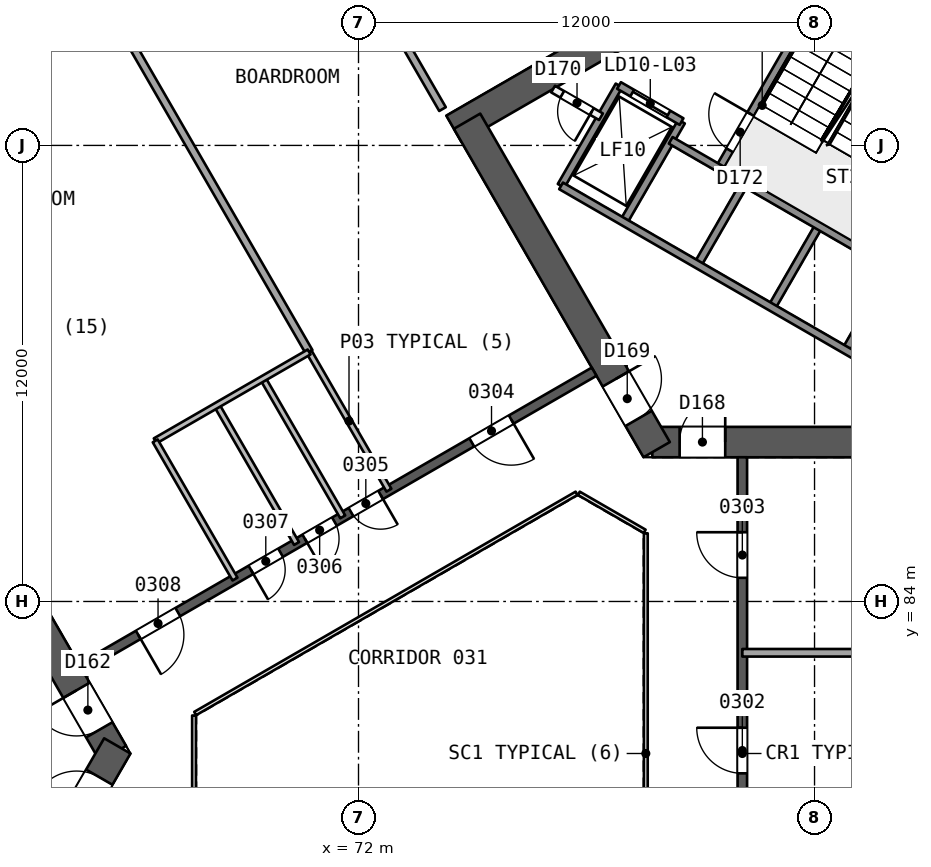
"""IFC4 building model, lengths in metres.
Left out: names, types, materials, properties, quantities, classifications, styles, units other than length and angle.
Written with IfcOpenShell. Run it as: python <this file> out.ifc"""

import sys

from ifc_helpers import new_model, si_unit, direction, frame, frame_2d, origin, place, context, subcontext, project, spatial, rectangle, extrude, element, fill, save


model = new_model("IFC4")
c1 = context("Model", 3, precision=1e-05, world=origin(), true_north=direction((0.0, 1.0)))
c2 = subcontext(c1, "Body", "Model", "MODEL_VIEW")
j1 = project(units=[si_unit("LENGTHUNIT", "METRE"), si_unit("PLANEANGLEUNIT", "RADIAN")], contexts=[c1])
p1 = place(None, origin())
s1 = spatial("IfcSite", under=j1, at=p1, CompositionType="ELEMENT")
p2 = place(p1, origin())
s2 = spatial("IfcBuilding", under=s1, at=p2, CompositionType="ELEMENT")
p3 = place(p2, frame((0.0, 0.0, 20.4)))
s3 = spatial("IfcBuildingStorey", under=s2, at=p3, CompositionType="ELEMENT", Elevation=20.4)
p4 = place(p3, frame((65.538, 80.0, 0.0), z_axis=(0.0, 0.0, 1.0), x_axis=(-0.49999662545, 0.866027352073, 0.0)))
e1 = element("IfcWall", 1, at=p4, inside=s3, PredefinedType="SHEAR", context=c2, shape_type="SweptSolid", body=[
    extrude(rectangle(XDim=10.149, YDim=0.8, at=frame_2d((5.074, 0.0))), origin(), (0.0, 0.0, 1.0), 5.0),
])
p5 = place(p4, frame((0.719, 0.0, 0.0)))
e2 = element("IfcOpeningElement", 2, at=p5, cuts=e1, PredefinedType="OPENING", context=c2, shape_type="SweptSolid", body=[
    extrude(rectangle(XDim=1.2, YDim=2.1, at=frame_2d((0.6, 1.05))), frame((0.0, 0.411, 0.0), z_axis=(0.0, -1.0, 0.0), x_axis=(1.0, 0.0, 0.0)), (0.0, 0.0, 1.0), 0.821),
])
p6 = place(p3, frame((60.664, 71.557, 0.0), z_axis=(0.0, 0.0, 1.0), x_axis=(0.50000409368, 0.866023040284, 0.0)))
e3 = element("IfcWall", 3, at=p6, inside=s3, PredefinedType="SHEAR", context=c2, shape_type="SweptSolid", body=[
    extrude(rectangle(XDim=9.98, YDim=0.8, at=frame_2d((4.99, 0.0))), origin(), (0.0, 0.0, 1.0), 5.0),
])
p7 = place(p6, frame((7.83, 0.0, 0.0)))
e4 = element("IfcOpeningElement", 4, at=p7, cuts=e3, PredefinedType="OPENING", context=c2, shape_type="SweptSolid", body=[
    extrude(rectangle(XDim=1.2, YDim=2.1, at=frame_2d((0.6, 1.05))), frame((0.0, 0.411, 0.0), z_axis=(0.0, -1.0, 0.0), x_axis=(1.0, 0.0, 0.0)), (0.0, 0.0, 1.0), 0.821),
])
p8 = place(p3, frame((79.731, 88.194, 0.0), z_axis=(0.0, 0.0, 1.0), x_axis=(1.0, 0.0, 0.0)))
e5 = element("IfcWall", 5, at=p8, inside=s3, PredefinedType="SHEAR", context=c2, shape_type="SweptSolid", body=[
    extrude(rectangle(XDim=10.149, YDim=0.8, at=frame_2d((5.074, 0.0))), origin(), (0.0, 0.0, 1.0), 5.0),
])
p9 = place(p8, frame((0.719, 0.0, 0.0)))
e6 = element("IfcOpeningElement", 6, at=p9, cuts=e5, PredefinedType="OPENING", context=c2, shape_type="SweptSolid", body=[
    extrude(rectangle(XDim=1.2, YDim=2.1, at=frame_2d((0.6, 1.05))), frame((0.0, 0.411, 0.0), z_axis=(0.0, -1.0, 0.0), x_axis=(1.0, 0.0, 0.0)), (0.0, 0.0, 1.0), 0.821),
])
p10 = place(p3, frame((86.723, 103.488, 0.0), z_axis=(0.0, 0.0, 1.0), x_axis=(-0.866032504327, -0.499987701298, 0.0)))
e7 = element("IfcWall", 7, at=p10, inside=s3, PredefinedType="SHEAR", context=c2, shape_type="SweptSolid", body=[
    extrude(rectangle(XDim=14.102, YDim=0.8, at=frame_2d((7.051, 0.0))), origin(), (0.0, 0.0, 1.0), 5.0),
])
p11 = place(p3, frame((74.856, 96.637, 0.0), z_axis=(0.0, 0.0, 1.0), x_axis=(0.499993500917, -0.866029155999, 0.0)))
e8 = element("IfcWall", 8, at=p11, inside=s3, PredefinedType="SHEAR", context=c2, shape_type="SweptSolid", body=[
    extrude(rectangle(XDim=9.98, YDim=0.8, at=frame_2d((4.99, 0.0))), origin(), (0.0, 0.0, 1.0), 5.0),
])
p12 = place(p11, frame((7.83, 0.0, 0.0)))
e9 = element("IfcOpeningElement", 9, at=p12, cuts=e8, PredefinedType="OPENING", context=c2, shape_type="SweptSolid", body=[
    extrude(rectangle(XDim=1.2, YDim=2.1, at=frame_2d((0.6, 1.05))), frame((0.0, 0.411, 0.0), z_axis=(0.0, -1.0, 0.0), x_axis=(1.0, 0.0, 0.0)), (0.0, 0.0, 1.0), 0.821),
])
p13 = place(p3, frame((82.1, 72.206, 0.0), z_axis=(0.0, 0.0, 1.0), x_axis=(0.0, 1.0, 0.0)))
e10 = element("IfcWall", 10, at=p13, inside=s3, PredefinedType="SHEAR", context=c2, shape_type="SweptSolid", body=[
    extrude(rectangle(XDim=15.588, YDim=0.25, at=frame_2d((7.794, 0.0))), origin(), (0.0, 0.0, 1.0), 4.5),
])
p14 = place(p13, frame((2.05, 0.0, 0.0)))
e11 = element("IfcOpeningElement", 11, at=p14, cuts=e10, PredefinedType="OPENING", context=c2, shape_type="SweptSolid", body=[
    extrude(rectangle(XDim=1.2, YDim=2.4, at=frame_2d((0.6, 1.2))), frame((0.0, 0.135, 0.0), z_axis=(0.0, -1.0, 0.0), x_axis=(1.0, 0.0, 0.0)), (0.0, 0.0, 1.0), 0.271),
])
p15 = place(p13, frame((7.272, 0.0, 0.0)))
e12 = element("IfcOpeningElement", 12, at=p15, cuts=e10, PredefinedType="OPENING", context=c2, shape_type="SweptSolid", body=[
    extrude(rectangle(XDim=1.2, YDim=2.4, at=frame_2d((0.6, 1.2))), frame((0.0, 0.135, 0.0), z_axis=(0.0, -1.0, 0.0), x_axis=(1.0, 0.0, 0.0)), (0.0, 0.0, 1.0), 0.271),
])
p16 = place(p13, frame((12.417, 0.0, 0.0)))
e13 = element("IfcOpeningElement", 13, at=p16, cuts=e10, PredefinedType="OPENING", context=c2, shape_type="SweptSolid", body=[
    extrude(rectangle(XDim=1.2, YDim=2.4, at=frame_2d((0.6, 1.2))), frame((0.0, 0.135, 0.0), z_axis=(0.0, -1.0, 0.0), x_axis=(1.0, 0.0, 0.0)), (0.0, 0.0, 1.0), 0.271),
])
p17 = place(p3, frame((78.2, 90.046, 0.0), z_axis=(0.0, 0.0, 1.0), x_axis=(-0.866026492143, -0.499998114903, 0.0)))
e14 = element("IfcWall", 14, at=p17, inside=s3, PredefinedType="SHEAR", context=c2, shape_type="SweptSolid", body=[
    extrude(rectangle(XDim=15.588, YDim=0.25, at=frame_2d((7.794, 0.0))), origin(), (0.0, 0.0, 1.0), 4.5),
])
p18 = place(p17, frame((2.518, 0.0, 0.0)))
e15 = element("IfcOpeningElement", 15, at=p18, cuts=e14, PredefinedType="OPENING", context=c2, shape_type="SweptSolid", body=[
    extrude(rectangle(XDim=1.2, YDim=2.4, at=frame_2d((0.6, 1.2))), frame((0.0, 0.135, 0.0), z_axis=(0.0, -1.0, 0.0), x_axis=(1.0, 0.0, 0.0)), (0.0, 0.0, 1.0), 0.271),
])
p19 = place(p17, frame((6.487, 0.0, 0.0)))
e16 = element("IfcOpeningElement", 16, at=p19, cuts=e14, PredefinedType="OPENING", context=c2, shape_type="SweptSolid", body=[
    extrude(rectangle(XDim=0.9, YDim=2.1, at=frame_2d((0.45, 1.05))), frame((0.0, 0.135, 0.0), z_axis=(0.0, -1.0, 0.0), x_axis=(1.0, 0.0, 0.0)), (0.0, 0.0, 1.0), 0.271),
])
p20 = place(p17, frame((7.89, 0.0, 0.0)))
e17 = element("IfcOpeningElement", 17, at=p20, cuts=e14, PredefinedType="OPENING", context=c2, shape_type="SweptSolid", body=[
    extrude(rectangle(XDim=0.9, YDim=2.1, at=frame_2d((0.45, 1.05))), frame((0.0, 0.135, 0.0), z_axis=(0.0, -1.0, 0.0), x_axis=(1.0, 0.0, 0.0)), (0.0, 0.0, 1.0), 0.271),
])
p21 = place(p17, frame((9.527, 0.0, 0.0)))
e18 = element("IfcOpeningElement", 18, at=p21, cuts=e14, PredefinedType="OPENING", context=c2, shape_type="SweptSolid", body=[
    extrude(rectangle(XDim=0.9, YDim=2.1, at=frame_2d((0.45, 1.05))), frame((0.0, 0.135, 0.0), z_axis=(0.0, -1.0, 0.0), x_axis=(1.0, 0.0, 0.0)), (0.0, 0.0, 1.0), 0.271),
])
p22 = place(p17, frame((12.65, 0.0, 0.0)))
e19 = element("IfcOpeningElement", 19, at=p22, cuts=e14, PredefinedType="OPENING", context=c2, shape_type="SweptSolid", body=[
    extrude(rectangle(XDim=1.2, YDim=2.4, at=frame_2d((0.6, 1.2))), frame((0.0, 0.135, 0.0), z_axis=(0.0, -1.0, 0.0), x_axis=(1.0, 0.0, 0.0)), (0.0, 0.0, 1.0), 0.271),
])
p23 = place(p3, frame((103.301, 82.65, 0.0), z_axis=(0.0, 0.0, 1.0), x_axis=(-1.0, 0.0, 0.0)))
e20 = element("IfcWall", 20, at=p23, inside=s3, PredefinedType="PARTITIONING", context=c2, shape_type="SweptSolid", body=[
    extrude(rectangle(XDim=21.201, YDim=0.2, at=frame_2d((10.601, 0.0))), origin(), (0.0, 0.0, 1.0), 4.5),
])
p24 = place(p3, frame((70.7, 90.565, 0.0), z_axis=(0.0, 0.0, 1.0), x_axis=(0.500027713859, -0.866009402589, 0.0)))
e21 = element("IfcWall", 21, at=p24, inside=s3, PredefinedType="PARTITIONING", context=c2, shape_type="SweptSolid", body=[
    extrude(rectangle(XDim=4.2, YDim=0.15, at=frame_2d((2.1, 0.0))), origin(), (0.0, 0.0, 1.0), 4.5),
])
p25 = place(p3, frame((62.2, 105.289, 0.0), z_axis=(0.0, 0.0, 1.0), x_axis=(0.49999717083, -0.8660270372, 0.0)))
e22 = element("IfcWall", 22, at=p25, inside=s3, PredefinedType="PARTITIONING", context=c2, shape_type="SweptSolid", body=[
    extrude(rectangle(XDim=17.001, YDim=0.2, at=frame_2d((8.5, 0.0))), origin(), (0.0, 0.0, 1.0), 4.5),
])
p26 = place(p3, frame((74.21, 96.956, 0.0), z_axis=(0.0, 0.0, 1.0), x_axis=(-0.499981745636, 0.86603594269, 0.0)))
e23 = element("IfcWall", 23, at=p26, inside=s3, PredefinedType="PARTITIONING", context=c2, shape_type="SweptSolid", body=[
    extrude(rectangle(XDim=6.765, YDim=0.2, at=frame_2d((3.382, 0.0))), origin(), (0.0, 0.0, 1.0), 4.5),
])
p27 = place(p26, frame((2.782, 0.0, 0.0)))
e24 = element("IfcOpeningElement", 24, at=p27, cuts=e23, PredefinedType="OPENING", context=c2, shape_type="SweptSolid", body=[
    extrude(rectangle(XDim=1.2, YDim=2.4, at=frame_2d((0.6, 1.2))), frame((0.0, 0.11, 0.0), z_axis=(0.0, -1.0, 0.0), x_axis=(1.0, 0.0, 0.0)), (0.0, 0.0, 1.0), 0.221),
])
p28 = place(p3, frame((69.485, 89.864, 0.0), z_axis=(0.0, 0.0, 1.0), x_axis=(0.49998411664, -0.866034573852, 0.0)))
e25 = element("IfcWall", 25, at=p28, inside=s3, PredefinedType="PARTITIONING", context=c2, shape_type="SweptSolid", body=[
    extrude(rectangle(XDim=4.2, YDim=0.15, at=frame_2d((2.1, 0.0))), origin(), (0.0, 0.0, 1.0), 4.5),
])
p29 = place(p3, frame((68.27, 89.163, 0.0), z_axis=(0.0, 0.0, 1.0), x_axis=(0.500002543286, -0.866023935413, 0.0)))
e26 = element("IfcWall", 26, at=p29, inside=s3, PredefinedType="PARTITIONING", context=c2, shape_type="SweptSolid", body=[
    extrude(rectangle(XDim=4.2, YDim=0.15, at=frame_2d((2.1, 0.0))), origin(), (0.0, 0.0, 1.0), 4.5),
])
p30 = place(p3, frame((70.7, 90.565, 0.0), z_axis=(0.0, 0.0, 1.0), x_axis=(-0.866017799667, -0.500013170487, 0.0)))
e27 = element("IfcWall", 27, at=p30, inside=s3, PredefinedType="PARTITIONING", context=c2, shape_type="SweptSolid", body=[
    extrude(rectangle(XDim=4.677, YDim=0.15, at=frame_2d((2.338, 0.0))), origin(), (0.0, 0.0, 1.0), 4.5),
])
p31 = place(p3, frame((66.65, 88.226, 0.0), z_axis=(0.0, 0.0, 1.0), x_axis=(0.500016035621, -0.866016145416, 0.0)))
e28 = element("IfcWall", 28, at=p31, inside=s3, PredefinedType="PARTITIONING", context=c2, shape_type="SweptSolid", body=[
    extrude(rectangle(XDim=4.199, YDim=0.15, at=frame_2d((2.1, 0.0))), origin(), (0.0, 0.0, 1.0), 4.5),
])
p32 = place(p3, frame((26.66, 85.0, 0.0), z_axis=(0.0, 0.0, 1.0), x_axis=(0.866025599265, 0.499999661418, 0.0)))
e29 = element("IfcWall", 29, at=p32, inside=s3, PredefinedType="SOLIDWALL", context=c2, shape_type="SweptSolid", body=[
    extrude(rectangle(XDim=78.727, YDim=0.4, at=frame_2d((39.364, 0.0))), origin(), (0.0, 0.0, 1.0), 4.5),
])
p33 = place(p32, frame((42.84, 0.0, 0.9)))
e30 = element("IfcOpeningElement", 30, at=p33, cuts=e29, PredefinedType="OPENING", context=c2, shape_type="SweptSolid", body=[
    extrude(rectangle(XDim=2.4, YDim=2.4, at=frame_2d((1.2, 1.2))), frame((0.0, 0.21, 0.0), z_axis=(0.0, -1.0, 0.0), x_axis=(1.0, 0.0, 0.0)), (0.0, 0.0, 1.0), 0.421),
])
p34 = place(p32, frame((37.385, 0.0, 0.9)))
e31 = element("IfcOpeningElement", 31, at=p34, cuts=e29, PredefinedType="OPENING", context=c2, shape_type="SweptSolid", body=[
    extrude(rectangle(XDim=2.4, YDim=2.4, at=frame_2d((1.2, 1.2))), frame((0.0, 0.21, 0.0), z_axis=(0.0, -1.0, 0.0), x_axis=(1.0, 0.0, 0.0)), (0.0, 0.0, 1.0), 0.421),
])
p35 = place(p32, frame((32.708, 0.0, 0.9)))
e32 = element("IfcOpeningElement", 32, at=p35, cuts=e29, PredefinedType="OPENING", context=c2, shape_type="SweptSolid", body=[
    extrude(rectangle(XDim=2.4, YDim=2.4, at=frame_2d((1.2, 1.2))), frame((0.0, 0.21, 0.0), z_axis=(0.0, -1.0, 0.0), x_axis=(1.0, 0.0, 0.0)), (0.0, 0.0, 1.0), 0.421),
])
for number, where, z_axis, x_axis in (
    (33, (84.821, 90.611, 0.0), (0.0, 0.0, 1.0), (0.5, 0.866, 0.0)),
    (34, (82.873, 91.736, 0.0), (0.0, 0.0, 1.0), (0.5, 0.866, 0.0)),
    (35, (80.924, 92.861, 0.0), (0.0, 0.0, 1.0), (0.5, 0.866, 0.0)),
):
    element("IfcWall", number, at=place(p3, frame(where, z_axis=z_axis, x_axis=x_axis)), inside=s3, PredefinedType="SOLIDWALL", context=c2, shape_type="SweptSolid", body=[
        extrude(rectangle(XDim=2.48, YDim=0.2, at=frame_2d((1.24, 0.0))), origin(), (0.0, 0.0, 1.0), 4.5),
    ])
p36 = place(p3, frame((81.493, 95.396, 0.0), z_axis=(0.0, 0.0, 1.0), x_axis=(0.500006057782, 0.866021906294, 0.0)))
e36 = element("IfcWall", 36, at=p36, inside=s3, PredefinedType="SOLIDWALL", context=c2, shape_type="SweptSolid", body=[
    extrude(rectangle(XDim=7.7, YDim=0.2, at=frame_2d((3.85, 0.0))), origin(), (0.0, 0.0, 1.0), 4.5),
])
p37 = place(p36, frame((0.55, 0.0, 0.0)))
e37 = element("IfcOpeningElement", 37, at=p37, cuts=e36, PredefinedType="OPENING", context=c2, shape_type="SweptSolid", body=[
    extrude(rectangle(XDim=1.1, YDim=2.1, at=frame_2d((0.55, 1.05))), frame((0.0, 0.11, 0.0), z_axis=(0.0, -1.0, 0.0), x_axis=(1.0, 0.0, 0.0)), (0.0, 0.0, 1.0), 0.221),
])
for number, where, z_axis, x_axis in (
    (38, (78.976, 93.986, 0.0), (0.0, 0.0, 1.0), (0.5, 0.866, 0.0)),
    (39, (77.33, 94.936, 0.0), (0.0, 0.0, 1.0), (0.5, 0.866, 0.0)),
):
    element("IfcWall", number, at=place(p3, frame(where, z_axis=z_axis, x_axis=x_axis)), inside=s3, PredefinedType="SOLIDWALL", context=c2, shape_type="SweptSolid", body=[
        extrude(rectangle(XDim=3.05, YDim=0.2, at=frame_2d((1.525, 0.0))), origin(), (0.0, 0.0, 1.0), 4.5),
    ])
p38 = place(p3, frame((86.77, 89.486, 0.0), z_axis=(0.0, 0.0, 1.0), x_axis=(-0.86601811187, 0.500012629753, 0.0)))
e40 = element("IfcWall", 40, at=p38, inside=s3, PredefinedType="SOLIDWALL", context=c2, shape_type="SweptSolid", body=[
    extrude(rectangle(XDim=10.9, YDim=0.2, at=frame_2d((5.45, 0.0))), origin(), (0.0, 0.0, 1.0), 4.5),
])
p39 = place(p3, frame((78.38, 96.755, 0.0), z_axis=(0.0, 0.0, 1.0), x_axis=(-0.866003949776, 0.500037157592, 0.0)))
e41 = element("IfcWall", 41, at=p39, inside=s3, PredefinedType="PARTITIONING", context=c2, shape_type="SweptSolid", body=[
    extrude(rectangle(XDim=1.455, YDim=0.2, at=frame_2d((0.728, 0.0))), origin(), (0.0, 0.0, 1.0), 4.5),
])
p40 = place(p39, frame((0.278, 0.0, 0.0)))
e42 = element("IfcOpeningElement", 42, at=p40, cuts=e41, PredefinedType="OPENING", context=c2, shape_type="SweptSolid", body=[
    extrude(rectangle(XDim=0.9, YDim=2.1, at=frame_2d((0.45, 1.05))), frame((0.0, 0.11, 0.0), z_axis=(0.0, -1.0, 0.0), x_axis=(1.0, 0.0, 0.0)), (0.0, 0.0, 1.0), 0.221),
])
p41 = place(p3, frame((88.01, 91.634, 0.0), z_axis=(0.0, 0.0, 1.0), x_axis=(-0.866024315419, 0.5000018851, 0.0)))
e43 = element("IfcWall", 43, at=p41, inside=s3, PredefinedType="SOLIDWALL", context=c2, shape_type="SweptSolid", body=[
    extrude(rectangle(XDim=9.0, YDim=0.2, at=frame_2d((4.5, 0.0))), origin(), (0.0, 0.0, 1.0), 4.5),
])
p42 = place(p3, frame((80.5, 96.627, 0.0), z_axis=(0.0, 0.0, 1.0), x_axis=(-0.86601224135, 0.500022797313, 0.0)))
e44 = element("IfcWall", 44, at=p42, inside=s3, PredefinedType="SOLIDWALL", context=c2, shape_type="SweptSolid", body=[
    extrude(rectangle(XDim=1.9, YDim=0.2, at=frame_2d((0.95, 0.0))), origin(), (0.0, 0.0, 1.0), 4.5),
])
p43 = place(p42, frame((0.4, 0.0, 0.0)))
e45 = element("IfcOpeningElement", 45, at=p43, cuts=e44, PredefinedType="OPENING", context=c2, shape_type="SweptSolid", body=[
    extrude(rectangle(XDim=1.1, YDim=2.1, at=frame_2d((0.55, 1.05))), frame((0.0, 0.11, 0.0), z_axis=(0.0, -1.0, 0.0), x_axis=(1.0, 0.0, 0.0)), (0.0, 0.0, 1.0), 0.221),
])
p44 = place(p3, frame((79.56, 74.206, 0.0), z_axis=(0.0, 0.0, 1.0), x_axis=(0.0, 1.0, 0.0)))
e46 = element("IfcWall", 46, at=p44, inside=s3, PredefinedType="PARTITIONING", context=c2, shape_type="SweptSolid", body=[
    extrude(rectangle(XDim=11.588, YDim=0.1, at=frame_2d((5.794, 0.0))), origin(), (0.0, 0.0, 1.0), 4.5),
])
p45 = place(p3, frame((79.53, 85.846, 0.0), z_axis=(0.0, 0.0, 1.0), x_axis=(-0.866041268327, 0.499972520799, 0.0)))
e47 = element("IfcWall", 47, at=p45, inside=s3, PredefinedType="PARTITIONING", context=c2, shape_type="SweptSolid", body=[
    extrude(rectangle(XDim=2.0, YDim=0.1, at=frame_2d((1.0, 0.0))), origin(), (0.0, 0.0, 1.0), 4.5),
])
p46 = place(p3, frame((77.738, 86.846, 0.0), z_axis=(0.0, 0.0, 1.0), x_axis=(-0.866026658274, -0.499997827154, 0.0)))
e48 = element("IfcWall", 48, at=p46, inside=s3, PredefinedType="PARTITIONING", context=c2, shape_type="SweptSolid", body=[
    extrude(rectangle(XDim=11.588, YDim=0.1, at=frame_2d((5.794, 0.0))), origin(), (0.0, 0.0, 1.0), 4.5),
])
p47 = place(p3, frame((67.672, 81.0, 0.0), z_axis=(0.0, 0.0, 1.0), x_axis=(0.0, -1.0, 0.0)))
e49 = element("IfcWall", 49, at=p47, inside=s3, PredefinedType="PARTITIONING", context=c2, shape_type="SweptSolid", body=[
    extrude(rectangle(XDim=2.0, YDim=0.1, at=frame_2d((1.0, 0.0))), origin(), (0.0, 0.0, 1.0), 4.5),
])
p48 = place(p15, origin())
e50 = element("IfcDoor", 50, at=p48, inside=s3, OperationType="SINGLE_SWING_RIGHT", PredefinedType="NOTDEFINED", context=c2, shape_type="SweptSolid", body=[
    extrude(rectangle(XDim=1.2, YDim=2.4, at=frame_2d((0.6, 1.2))), frame((0.0, 0.025, 0.0), z_axis=(0.0, -1.0, 0.0), x_axis=(1.0, 0.0, 0.0)), (0.0, 0.0, 1.0), 0.05),
])
fill(e12, e50)
p49 = place(p16, origin())
e51 = element("IfcDoor", 51, at=p49, inside=s3, OperationType="SINGLE_SWING_RIGHT", PredefinedType="NOTDEFINED", context=c2, shape_type="SweptSolid", body=[
    extrude(rectangle(XDim=1.2, YDim=2.4, at=frame_2d((0.6, 1.2))), frame((0.0, 0.025, 0.0), z_axis=(0.0, -1.0, 0.0), x_axis=(1.0, 0.0, 0.0)), (0.0, 0.0, 1.0), 0.05),
])
fill(e13, e51)
p50 = place(p18, origin())
e52 = element("IfcDoor", 52, at=p50, inside=s3, OperationType="SINGLE_SWING_LEFT", PredefinedType="NOTDEFINED", context=c2, shape_type="SweptSolid", body=[
    extrude(rectangle(XDim=1.2, YDim=2.4, at=frame_2d((0.6, 1.2))), frame((0.0, 0.025, 0.0), z_axis=(0.0, -1.0, 0.0), x_axis=(1.0, 0.0, 0.0)), (0.0, 0.0, 1.0), 0.05),
])
fill(e15, e52)
p51 = place(p19, origin())
e53 = element("IfcDoor", 53, at=p51, inside=s3, OperationType="SINGLE_SWING_LEFT", PredefinedType="NOTDEFINED", context=c2, shape_type="SweptSolid", body=[
    extrude(rectangle(XDim=0.9, YDim=2.1, at=frame_2d((0.45, 1.05))), frame((0.0, 0.025, 0.0), z_axis=(0.0, -1.0, 0.0), x_axis=(1.0, 0.0, 0.0)), (0.0, 0.0, 1.0), 0.05),
])
fill(e16, e53)
p52 = place(p20, origin())
e54 = element("IfcDoor", 54, at=p52, inside=s3, OperationType="SINGLE_SWING_RIGHT", PredefinedType="NOTDEFINED", context=c2, shape_type="SweptSolid", body=[
    extrude(rectangle(XDim=0.9, YDim=2.1, at=frame_2d((0.45, 1.05))), frame((0.0, 0.025, 0.0), z_axis=(0.0, -1.0, 0.0), x_axis=(1.0, 0.0, 0.0)), (0.0, 0.0, 1.0), 0.05),
])
fill(e17, e54)
p53 = place(p21, origin())
e55 = element("IfcDoor", 55, at=p53, inside=s3, OperationType="SINGLE_SWING_RIGHT", PredefinedType="NOTDEFINED", context=c2, shape_type="SweptSolid", body=[
    extrude(rectangle(XDim=0.9, YDim=2.1, at=frame_2d((0.45, 1.05))), frame((0.0, 0.025, 0.0), z_axis=(0.0, -1.0, 0.0), x_axis=(1.0, 0.0, 0.0)), (0.0, 0.0, 1.0), 0.05),
])
fill(e18, e55)
p54 = place(p22, origin())
e56 = element("IfcDoor", 56, at=p54, inside=s3, OperationType="SINGLE_SWING_RIGHT", PredefinedType="NOTDEFINED", context=c2, shape_type="SweptSolid", body=[
    extrude(rectangle(XDim=1.2, YDim=2.4, at=frame_2d((0.6, 1.2))), frame((0.0, 0.025, 0.0), z_axis=(0.0, -1.0, 0.0), x_axis=(1.0, 0.0, 0.0)), (0.0, 0.0, 1.0), 0.05),
])
fill(e19, e56)
p55 = place(p5, origin())
e57 = element("IfcDoor", 57, at=p55, inside=s3, OperationType="SINGLE_SWING_RIGHT", PredefinedType="NOTDEFINED", context=c2, shape_type="SweptSolid", body=[
    extrude(rectangle(XDim=1.2, YDim=2.1, at=frame_2d((0.6, 1.05))), frame((0.0, 0.025, 0.0), z_axis=(0.0, -1.0, 0.0), x_axis=(1.0, 0.0, 0.0)), (0.0, 0.0, 1.0), 0.05),
])
fill(e2, e57)
p56 = place(p7, origin())
e58 = element("IfcDoor", 58, at=p56, inside=s3, OperationType="SINGLE_SWING_LEFT", PredefinedType="NOTDEFINED", context=c2, shape_type="SweptSolid", body=[
    extrude(rectangle(XDim=1.2, YDim=2.1, at=frame_2d((0.6, 1.05))), frame((0.0, 0.025, 0.0), z_axis=(0.0, -1.0, 0.0), x_axis=(1.0, 0.0, 0.0)), (0.0, 0.0, 1.0), 0.05),
])
fill(e4, e58)
p57 = place(p9, origin())
e59 = element("IfcDoor", 59, at=p57, inside=s3, OperationType="SINGLE_SWING_RIGHT", PredefinedType="NOTDEFINED", context=c2, shape_type="SweptSolid", body=[
    extrude(rectangle(XDim=1.2, YDim=2.1, at=frame_2d((0.6, 1.05))), frame((0.0, 0.025, 0.0), z_axis=(0.0, -1.0, 0.0), x_axis=(1.0, 0.0, 0.0)), (0.0, 0.0, 1.0), 0.05),
])
fill(e6, e59)
p58 = place(p12, origin())
e60 = element("IfcDoor", 60, at=p58, inside=s3, OperationType="SINGLE_SWING_LEFT", PredefinedType="NOTDEFINED", context=c2, shape_type="SweptSolid", body=[
    extrude(rectangle(XDim=1.2, YDim=2.1, at=frame_2d((0.6, 1.05))), frame((0.0, 0.025, 0.0), z_axis=(0.0, -1.0, 0.0), x_axis=(1.0, 0.0, 0.0)), (0.0, 0.0, 1.0), 0.05),
])
fill(e9, e60)
p59 = place(p43, origin())
e61 = element("IfcDoor", 61, at=p59, inside=s3, OperationType="SLIDING_TO_RIGHT", PredefinedType="NOTDEFINED", context=c2, shape_type="SweptSolid", body=[
    extrude(rectangle(XDim=1.1, YDim=2.1, at=frame_2d((0.55, 1.05))), frame((0.0, 0.025, 0.0), z_axis=(0.0, -1.0, 0.0), x_axis=(1.0, 0.0, 0.0)), (0.0, 0.0, 1.0), 0.05),
])
fill(e45, e61)
p60 = place(p40, origin())
e62 = element("IfcDoor", 62, at=p60, inside=s3, OperationType="SINGLE_SWING_LEFT", PredefinedType="NOTDEFINED", context=c2, shape_type="SweptSolid", body=[
    extrude(rectangle(XDim=0.9, YDim=2.1, at=frame_2d((0.45, 1.05))), frame((0.0, 0.025, 0.0), z_axis=(0.0, -1.0, 0.0), x_axis=(1.0, 0.0, 0.0)), (0.0, 0.0, 1.0), 0.05),
])
fill(e42, e62)
p61 = place(p37, origin())
e63 = element("IfcDoor", 63, at=p61, inside=s3, OperationType="SINGLE_SWING_RIGHT", PredefinedType="NOTDEFINED", context=c2, shape_type="SweptSolid", body=[
    extrude(rectangle(XDim=1.1, YDim=2.1, at=frame_2d((0.55, 1.05))), frame((0.0, 0.025, 0.0), z_axis=(0.0, -1.0, 0.0), x_axis=(1.0, 0.0, 0.0)), (0.0, 0.0, 1.0), 0.05),
])
fill(e37, e63)
save(model, sys.argv[1])
